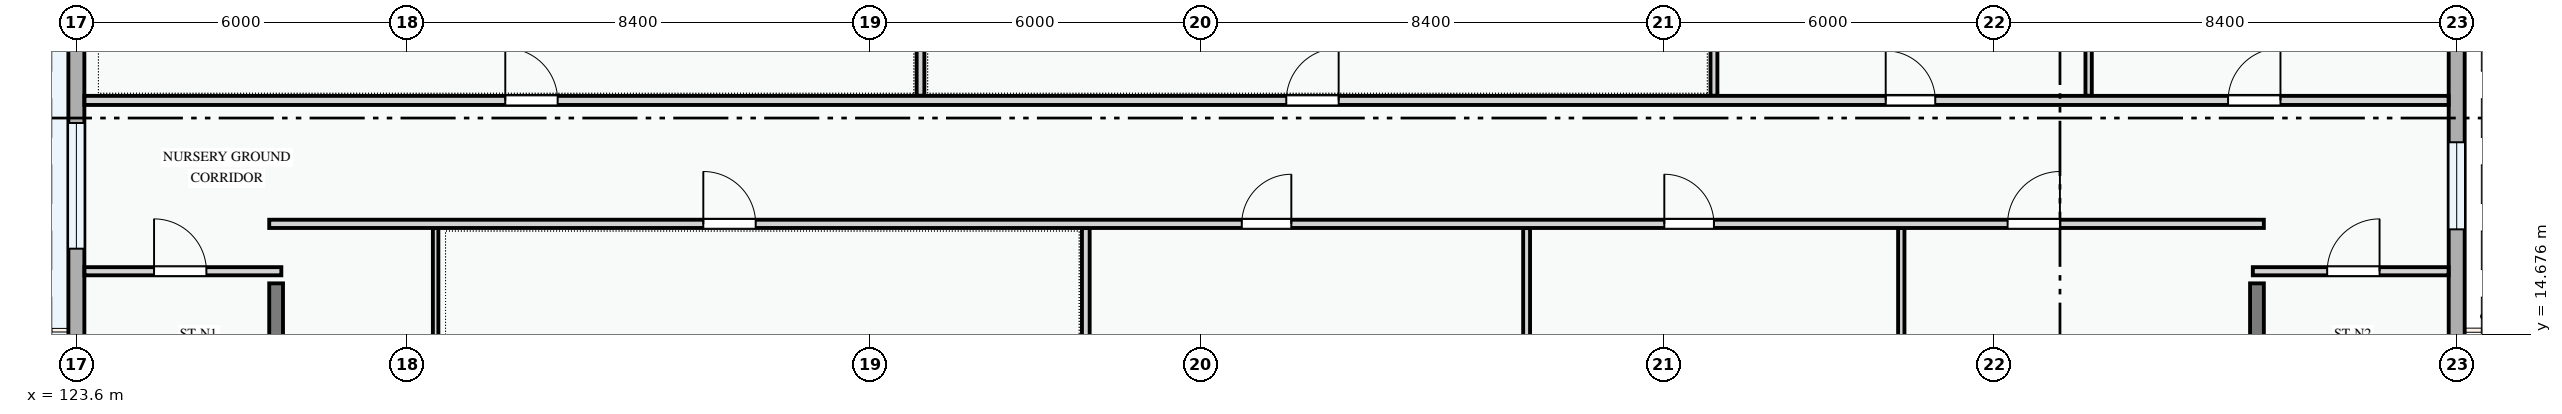
"""IFC4 building model, lengths in metres.
Left out: names, types, materials, properties, quantities, classifications, styles, units other than length and angle.
Written with IfcOpenShell. Run it as: python <this file> out.ifc"""

import sys

from ifc_helpers import new_model, si_unit, direction, frame, frame_2d, origin, place, context, subcontext, project, spatial, rectangle, extrude, element, fill, save


model = new_model("IFC4")
c1 = context("Model", 3, precision=1e-05, world=origin(), true_north=direction((0.0, 1.0)))
c2 = subcontext(c1, "Body", "Model", "MODEL_VIEW")
j1 = project(units=[si_unit("LENGTHUNIT", "METRE"), si_unit("PLANEANGLEUNIT", "RADIAN")], contexts=[c1])
p1 = place(None, origin())
s1 = spatial("IfcSite", under=j1, at=p1, CompositionType="ELEMENT")
p2 = place(p1, origin())
s2 = spatial("IfcBuilding", under=s1, at=p2, CompositionType="ELEMENT")
p3 = place(p2, origin())
s3 = spatial("IfcBuildingStorey", under=s2, at=p3, CompositionType="ELEMENT", Elevation=0.0)
p4 = place(p3, frame((166.8, 14.4, 0.0), z_axis=(0.0, 0.0, 1.0), x_axis=(0.0, 1.0, 0.0)))
e1 = element("IfcWall", 1, at=p4, inside=s3, PredefinedType="STANDARD", context=c2, shape_type="SweptSolid", body=[
    extrude(rectangle(XDim=8.4, YDim=0.29, at=frame_2d((4.2, 0.0))), origin(), (0.0, 0.0, 1.0), 3.485),
])
p5 = place(p4, frame((2.18, 0.0, 0.72)))
e2 = element("IfcOpeningElement", 2, at=p5, cuts=e1, PredefinedType="OPENING", context=c2, shape_type="SweptSolid", body=[
    extrude(rectangle(XDim=1.58, YDim=1.48, at=frame_2d((0.79, 0.74))), frame((0.0, 0.155, 0.0), z_axis=(0.0, -1.0, 0.0), x_axis=(1.0, 0.0, 0.0)), (0.0, 0.0, 1.0), 0.31),
])
p6 = place(p4, frame((5.49, 0.0, 0.72)))
e3 = element("IfcOpeningElement", 3, at=p6, cuts=e1, PredefinedType="OPENING", context=c2, shape_type="SweptSolid", body=[
    extrude(rectangle(XDim=1.75, YDim=1.45, at=frame_2d((0.875, 0.725))), frame((0.0, 0.155, 0.0), z_axis=(0.0, -1.0, 0.0), x_axis=(1.0, 0.0, 0.0)), (0.0, 0.0, 1.0), 0.31),
])
p7 = place(p3, frame((123.6, 22.8, 0.0), z_axis=(0.0, 0.0, 1.0), x_axis=(0.0, -1.0, 0.0)))
e4 = element("IfcWall", 4, at=p7, inside=s3, PredefinedType="STANDARD", context=c2, shape_type="SweptSolid", body=[
    extrude(rectangle(XDim=8.4, YDim=0.29, at=frame_2d((4.2, 0.0))), origin(), (0.0, 0.0, 1.0), 3.485),
])
p8 = place(p7, frame((1.275, 0.0, 0.72)))
e5 = element("IfcOpeningElement", 5, at=p8, cuts=e4, PredefinedType="OPENING", context=c2, shape_type="SweptSolid", body=[
    extrude(rectangle(XDim=1.52, YDim=1.42, at=frame_2d((0.76, 0.71))), frame((0.0, 0.155, 0.0), z_axis=(0.0, -1.0, 0.0), x_axis=(1.0, 0.0, 0.0)), (0.0, 0.0, 1.0), 0.31),
])
p9 = place(p7, frame((4.29, 0.0, 0.72)))
e6 = element("IfcOpeningElement", 6, at=p9, cuts=e4, PredefinedType="OPENING", context=c2, shape_type="SweptSolid", body=[
    extrude(rectangle(XDim=2.28, YDim=1.46, at=frame_2d((1.14, 0.73))), frame((0.0, 0.155, 0.0), z_axis=(0.0, -1.0, 0.0), x_axis=(1.0, 0.0, 0.0)), (0.0, 0.0, 1.0), 0.31),
])
for number, where, z_axis, x_axis in (
    (7, (127.225, 15.6, 0.0), (0.0, 0.0, 1.0), (0.0, -1.0, 0.0)),
    (8, (163.175, 15.6, 0.0), (0.0, 0.0, 1.0), (0.0, -1.0, 0.0)),
):
    element("IfcWall", number, at=place(p3, frame(where, z_axis=z_axis, x_axis=x_axis)), inside=s3, PredefinedType="SHEAR", context=c2, shape_type="SweptSolid", body=[
        extrude(rectangle(XDim=6.7, YDim=0.25, at=frame_2d((3.35, 0.0))), origin(), (0.0, 0.0, 1.0), 4.2),
    ])
p10 = place(p3, frame((130.12, 8.547, 0.0), z_axis=(0.0, 0.0, 1.0), x_axis=(0.0, 1.0, 0.0)))
e9 = element("IfcWall", 9, at=p10, inside=s3, PredefinedType="PARTITIONING", context=c2, shape_type="SweptSolid", body=[
    extrude(rectangle(XDim=8.056, YDim=0.1, at=frame_2d((4.028, 0.0))), origin(), (0.0, 0.0, 1.0), 4.2),
])
p11 = place(p3, frame((141.92, 8.547, 0.0), z_axis=(0.0, 0.0, 1.0), x_axis=(0.0, 1.0, 0.0)))
e10 = element("IfcWall", 10, at=p11, inside=s3, PredefinedType="PARTITIONING", context=c2, shape_type="SweptSolid", body=[
    extrude(rectangle(XDim=8.056, YDim=0.14, at=frame_2d((4.028, 0.0))), origin(), (0.0, 0.0, 1.0), 4.2),
])
p12 = place(p3, frame((149.92, 8.547, 0.0), z_axis=(0.0, 0.0, 1.0), x_axis=(0.0, 1.0, 0.0)))
e11 = element("IfcWall", 11, at=p12, inside=s3, PredefinedType="PARTITIONING", context=c2, shape_type="SweptSolid", body=[
    extrude(rectangle(XDim=8.056, YDim=0.125, at=frame_2d((4.028, 0.0))), origin(), (0.0, 0.0, 1.0), 4.2),
])
p13 = place(p3, frame((156.72, 8.547, 0.0), z_axis=(0.0, 0.0, 1.0), x_axis=(0.0, 1.0, 0.0)))
e12 = element("IfcWall", 12, at=p13, inside=s3, PredefinedType="PARTITIONING", context=c2, shape_type="SweptSolid", body=[
    extrude(rectangle(XDim=8.056, YDim=0.115, at=frame_2d((4.028, 0.0))), origin(), (0.0, 0.0, 1.0), 4.2),
])
p14 = place(p3, frame((138.92, 19.004, 0.0), z_axis=(0.0, 0.0, 1.0), x_axis=(0.0, 1.0, 0.0)))
e13 = element("IfcWall", 13, at=p14, inside=s3, PredefinedType="PARTITIONING", context=c2, shape_type="SweptSolid", body=[
    extrude(rectangle(XDim=9.736, YDim=0.14, at=frame_2d((4.868, 0.0))), origin(), (0.0, 0.0, 1.0), 4.2),
])
p15 = place(p3, frame((153.32, 19.004, 0.0), z_axis=(0.0, 0.0, 1.0), x_axis=(0.0, 1.0, 0.0)))
e14 = element("IfcWall", 14, at=p15, inside=s3, PredefinedType="PARTITIONING", context=c2, shape_type="SweptSolid", body=[
    extrude(rectangle(XDim=9.736, YDim=0.125, at=frame_2d((4.868, 0.0))), origin(), (0.0, 0.0, 1.0), 4.2),
])
p16 = place(p3, frame((160.12, 19.004, 0.0), z_axis=(0.0, 0.0, 1.0), x_axis=(0.0, 1.0, 0.0)))
e15 = element("IfcWall", 15, at=p16, inside=s3, PredefinedType="PARTITIONING", context=c2, shape_type="SweptSolid", body=[
    extrude(rectangle(XDim=9.649, YDim=0.115, at=frame_2d((4.824, 0.0))), origin(), (0.0, 0.0, 1.0), 4.2),
])
p17 = place(p3, frame((127.1, 16.68, 0.0), z_axis=(0.0, 0.0, 1.0), x_axis=(1.0, 0.0, 0.0)))
e16 = element("IfcWall", 16, at=p17, inside=s3, PredefinedType="PARTITIONING", context=c2, shape_type="SweptSolid", body=[
    extrude(rectangle(XDim=36.2, YDim=0.15, at=frame_2d((18.1, 0.0))), origin(), (0.0, 0.0, 1.0), 4.2),
])
p18 = place(p17, frame((7.878, 0.0, 0.0)))
e17 = element("IfcOpeningElement", 17, at=p18, cuts=e16, PredefinedType="OPENING", context=c2, shape_type="SweptSolid", body=[
    extrude(rectangle(XDim=0.95, YDim=2.1, at=frame_2d((0.475, 1.05))), frame((0.0, 0.085, 0.0), z_axis=(0.0, -1.0, 0.0), x_axis=(1.0, 0.0, 0.0)), (0.0, 0.0, 1.0), 0.17),
])
p19 = place(p17, frame((17.65, 0.0, 0.0)))
e18 = element("IfcOpeningElement", 18, at=p19, cuts=e16, PredefinedType="OPENING", context=c2, shape_type="SweptSolid", body=[
    extrude(rectangle(XDim=0.9, YDim=2.1, at=frame_2d((0.45, 1.05))), frame((0.0, 0.085, 0.0), z_axis=(0.0, -1.0, 0.0), x_axis=(1.0, 0.0, 0.0)), (0.0, 0.0, 1.0), 0.17),
])
p20 = place(p17, frame((25.319, 0.0, 0.0)))
e19 = element("IfcOpeningElement", 19, at=p20, cuts=e16, PredefinedType="OPENING", context=c2, shape_type="SweptSolid", body=[
    extrude(rectangle(XDim=0.9, YDim=2.1, at=frame_2d((0.45, 1.05))), frame((0.0, 0.085, 0.0), z_axis=(0.0, -1.0, 0.0), x_axis=(1.0, 0.0, 0.0)), (0.0, 0.0, 1.0), 0.17),
])
p21 = place(p17, frame((31.549, 0.0, 0.0)))
e20 = element("IfcOpeningElement", 20, at=p21, cuts=e16, PredefinedType="OPENING", context=c2, shape_type="SweptSolid", body=[
    extrude(rectangle(XDim=0.95, YDim=2.1, at=frame_2d((0.475, 1.05))), frame((0.0, 0.085, 0.0), z_axis=(0.0, -1.0, 0.0), x_axis=(1.0, 0.0, 0.0)), (0.0, 0.0, 1.0), 0.17),
])
p22 = place(p3, frame((123.747, 18.92, 0.0), z_axis=(0.0, 0.0, 1.0), x_axis=(1.0, 0.0, 0.0)))
e21 = element("IfcWall", 21, at=p22, inside=s3, PredefinedType="PARTITIONING", context=c2, shape_type="SweptSolid", body=[
    extrude(rectangle(XDim=42.906, YDim=0.165, at=frame_2d((21.453, 0.0))), origin(), (0.0, 0.0, 1.0), 4.2),
])
p23 = place(p22, frame((7.637, 0.0, 0.0)))
e22 = element("IfcOpeningElement", 22, at=p23, cuts=e21, PredefinedType="OPENING", context=c2, shape_type="SweptSolid", body=[
    extrude(rectangle(XDim=0.95, YDim=2.1, at=frame_2d((0.475, 1.05))), frame((0.0, 0.093, 0.0), z_axis=(0.0, -1.0, 0.0), x_axis=(1.0, 0.0, 0.0)), (0.0, 0.0, 1.0), 0.185),
])
p24 = place(p22, frame((21.812, 0.0, 0.0)))
e23 = element("IfcOpeningElement", 23, at=p24, cuts=e21, PredefinedType="OPENING", context=c2, shape_type="SweptSolid", body=[
    extrude(rectangle(XDim=0.95, YDim=2.1, at=frame_2d((0.475, 1.05))), frame((0.0, 0.093, 0.0), z_axis=(0.0, -1.0, 0.0), x_axis=(1.0, 0.0, 0.0)), (0.0, 0.0, 1.0), 0.185),
])
p25 = place(p22, frame((32.69, 0.0, 0.0)))
e24 = element("IfcOpeningElement", 24, at=p25, cuts=e21, PredefinedType="OPENING", context=c2, shape_type="SweptSolid", body=[
    extrude(rectangle(XDim=0.9, YDim=2.1, at=frame_2d((0.45, 1.05))), frame((0.0, 0.093, 0.0), z_axis=(0.0, -1.0, 0.0), x_axis=(1.0, 0.0, 0.0)), (0.0, 0.0, 1.0), 0.185),
])
p26 = place(p22, frame((38.905, 0.0, 0.0)))
e25 = element("IfcOpeningElement", 25, at=p26, cuts=e21, PredefinedType="OPENING", context=c2, shape_type="SweptSolid", body=[
    extrude(rectangle(XDim=0.95, YDim=2.1, at=frame_2d((0.475, 1.05))), frame((0.0, 0.093, 0.0), z_axis=(0.0, -1.0, 0.0), x_axis=(1.0, 0.0, 0.0)), (0.0, 0.0, 1.0), 0.185),
])
p27 = place(p3, frame((123.747, 15.82, 0.0), z_axis=(0.0, 0.0, 1.0), x_axis=(1.0, 0.0, 0.0)))
e26 = element("IfcWall", 26, at=p27, inside=s3, PredefinedType="PARTITIONING", context=c2, shape_type="SweptSolid", body=[
    extrude(rectangle(XDim=3.573, YDim=0.148, at=frame_2d((1.787, 0.0))), origin(), (0.0, 0.0, 1.0), 4.2),
])
p28 = place(p27, frame((1.263, 0.0, 0.0)))
e27 = element("IfcOpeningElement", 27, at=p28, cuts=e26, PredefinedType="OPENING", context=c2, shape_type="SweptSolid", body=[
    extrude(rectangle(XDim=0.95, YDim=2.1, at=frame_2d((0.475, 1.05))), frame((0.0, 0.084, 0.0), z_axis=(0.0, -1.0, 0.0), x_axis=(1.0, 0.0, 0.0)), (0.0, 0.0, 1.0), 0.168),
])
p29 = place(p3, frame((163.1, 15.82, 0.0), z_axis=(0.0, 0.0, 1.0), x_axis=(1.0, 0.0, 0.0)))
e28 = element("IfcWall", 28, at=p29, inside=s3, PredefinedType="PARTITIONING", context=c2, shape_type="SweptSolid", body=[
    extrude(rectangle(XDim=3.553, YDim=0.148, at=frame_2d((1.776, 0.0))), origin(), (0.0, 0.0, 1.0), 4.2),
])
p30 = place(p29, frame((1.35, 0.0, 0.0)))
e29 = element("IfcOpeningElement", 29, at=p30, cuts=e28, PredefinedType="OPENING", context=c2, shape_type="SweptSolid", body=[
    extrude(rectangle(XDim=0.95, YDim=2.1, at=frame_2d((0.475, 1.05))), frame((0.0, 0.084, 0.0), z_axis=(0.0, -1.0, 0.0), x_axis=(1.0, 0.0, 0.0)), (0.0, 0.0, 1.0), 0.168),
])
p31 = place(p5, origin())
e30 = element("IfcWindow", 30, at=p31, inside=s3, PartitioningType="SINGLE_PANEL", PredefinedType="WINDOW", context=c2, shape_type="SweptSolid", body=[
    extrude(rectangle(XDim=1.58, YDim=1.48, at=frame_2d((0.79, 0.74))), frame((0.0, 0.03, 0.0), z_axis=(0.0, -1.0, 0.0), x_axis=(1.0, 0.0, 0.0)), (0.0, 0.0, 1.0), 0.06),
])
fill(e2, e30)
p32 = place(p9, origin())
e31 = element("IfcWindow", 31, at=p32, inside=s3, PartitioningType="DOUBLE_PANEL_VERTICAL", PredefinedType="WINDOW", context=c2, shape_type="SweptSolid", body=[
    extrude(rectangle(XDim=2.28, YDim=1.46, at=frame_2d((1.14, 0.73))), frame((0.0, 0.03, 0.0), z_axis=(0.0, -1.0, 0.0), x_axis=(1.0, 0.0, 0.0)), (0.0, 0.0, 1.0), 0.06),
])
fill(e6, e31)
p33 = place(p18, origin())
e32 = element("IfcDoor", 32, at=p33, inside=s3, OperationType="SINGLE_SWING_LEFT", PredefinedType="DOOR", context=c2, shape_type="SweptSolid", body=[
    extrude(rectangle(XDim=0.95, YDim=2.1, at=frame_2d((0.475, 1.05))), frame((0.0, 0.025, 0.0), z_axis=(0.0, -1.0, 0.0), x_axis=(1.0, 0.0, 0.0)), (0.0, 0.0, 1.0), 0.05),
])
fill(e17, e32)
p34 = place(p19, origin())
e33 = element("IfcDoor", 33, at=p34, inside=s3, OperationType="SINGLE_SWING_RIGHT", PredefinedType="DOOR", context=c2, shape_type="SweptSolid", body=[
    extrude(rectangle(XDim=0.9, YDim=2.1, at=frame_2d((0.45, 1.05))), frame((0.0, 0.025, 0.0), z_axis=(0.0, -1.0, 0.0), x_axis=(1.0, 0.0, 0.0)), (0.0, 0.0, 1.0), 0.05),
])
fill(e18, e33)
p35 = place(p20, origin())
e34 = element("IfcDoor", 34, at=p35, inside=s3, OperationType="SINGLE_SWING_LEFT", PredefinedType="DOOR", context=c2, shape_type="SweptSolid", body=[
    extrude(rectangle(XDim=0.9, YDim=2.1, at=frame_2d((0.45, 1.05))), frame((0.0, 0.025, 0.0), z_axis=(0.0, -1.0, 0.0), x_axis=(1.0, 0.0, 0.0)), (0.0, 0.0, 1.0), 0.05),
])
fill(e19, e34)
p36 = place(p21, origin())
e35 = element("IfcDoor", 35, at=p36, inside=s3, OperationType="SINGLE_SWING_RIGHT", PredefinedType="DOOR", context=c2, shape_type="SweptSolid", body=[
    extrude(rectangle(XDim=0.95, YDim=2.1, at=frame_2d((0.475, 1.05))), frame((0.0, 0.025, 0.0), z_axis=(0.0, -1.0, 0.0), x_axis=(1.0, 0.0, 0.0)), (0.0, 0.0, 1.0), 0.05),
])
fill(e20, e35)
p37 = place(p23, origin())
e36 = element("IfcDoor", 36, at=p37, inside=s3, OperationType="SINGLE_SWING_LEFT", PredefinedType="DOOR", context=c2, shape_type="SweptSolid", body=[
    extrude(rectangle(XDim=0.95, YDim=2.1, at=frame_2d((0.475, 1.05))), frame((0.0, 0.025, 0.0), z_axis=(0.0, -1.0, 0.0), x_axis=(1.0, 0.0, 0.0)), (0.0, 0.0, 1.0), 0.05),
])
fill(e22, e36)
p38 = place(p24, origin())
e37 = element("IfcDoor", 37, at=p38, inside=s3, OperationType="SINGLE_SWING_RIGHT", PredefinedType="DOOR", context=c2, shape_type="SweptSolid", body=[
    extrude(rectangle(XDim=0.95, YDim=2.1, at=frame_2d((0.475, 1.05))), frame((0.0, 0.025, 0.0), z_axis=(0.0, -1.0, 0.0), x_axis=(1.0, 0.0, 0.0)), (0.0, 0.0, 1.0), 0.05),
])
fill(e23, e37)
p39 = place(p25, origin())
e38 = element("IfcDoor", 38, at=p39, inside=s3, OperationType="SINGLE_SWING_LEFT", PredefinedType="DOOR", context=c2, shape_type="SweptSolid", body=[
    extrude(rectangle(XDim=0.9, YDim=2.1, at=frame_2d((0.45, 1.05))), frame((0.0, 0.025, 0.0), z_axis=(0.0, -1.0, 0.0), x_axis=(1.0, 0.0, 0.0)), (0.0, 0.0, 1.0), 0.05),
])
fill(e24, e38)
p40 = place(p26, origin())
e39 = element("IfcDoor", 39, at=p40, inside=s3, OperationType="SINGLE_SWING_RIGHT", PredefinedType="DOOR", context=c2, shape_type="SweptSolid", body=[
    extrude(rectangle(XDim=0.95, YDim=2.1, at=frame_2d((0.475, 1.05))), frame((0.0, 0.025, 0.0), z_axis=(0.0, -1.0, 0.0), x_axis=(1.0, 0.0, 0.0)), (0.0, 0.0, 1.0), 0.05),
])
fill(e25, e39)
p41 = place(p28, origin())
e40 = element("IfcDoor", 40, at=p41, inside=s3, OperationType="SINGLE_SWING_LEFT", PredefinedType="DOOR", context=c2, shape_type="SweptSolid", body=[
    extrude(rectangle(XDim=0.95, YDim=2.1, at=frame_2d((0.475, 1.05))), frame((0.0, 0.025, 0.0), z_axis=(0.0, -1.0, 0.0), x_axis=(1.0, 0.0, 0.0)), (0.0, 0.0, 1.0), 0.05),
])
fill(e27, e40)
p42 = place(p30, origin())
e41 = element("IfcDoor", 41, at=p42, inside=s3, OperationType="SINGLE_SWING_RIGHT", PredefinedType="DOOR", context=c2, shape_type="SweptSolid", body=[
    extrude(rectangle(XDim=0.95, YDim=2.1, at=frame_2d((0.475, 1.05))), frame((0.0, 0.025, 0.0), z_axis=(0.0, -1.0, 0.0), x_axis=(1.0, 0.0, 0.0)), (0.0, 0.0, 1.0), 0.05),
])
fill(e29, e41)
save(model, sys.argv[1])
